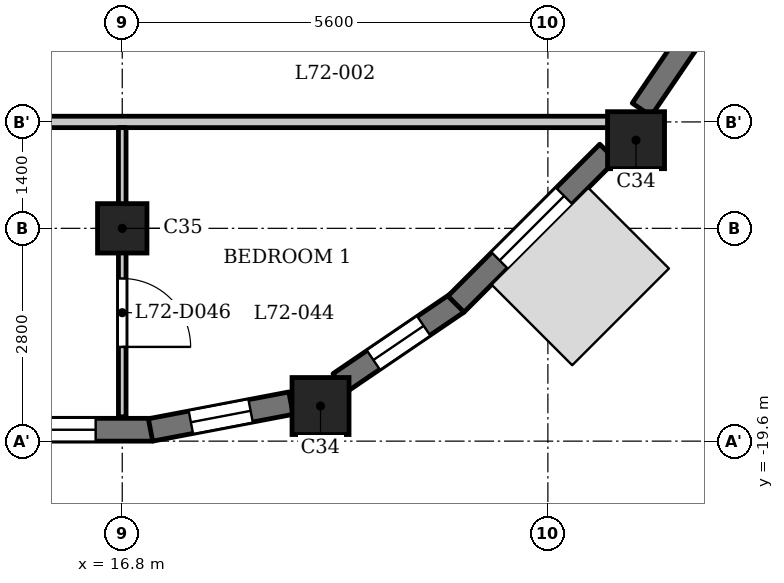
"""IFC4 building model, lengths in metres.
Left out: names, types, materials, properties, quantities, classifications, styles, units other than length and angle.
Written with IfcOpenShell. Run it as: python <this file> out.ifc"""

import sys

from ifc_helpers import new_model, si_unit, direction, frame, frame_2d, origin, origin_2d, place, context, subcontext, project, spatial, rectangle, extrude, element, fill, save


model = new_model("IFC4")
c1 = context("Model", 3, precision=1e-05, world=origin(), true_north=direction((0.0, 1.0)))
c2 = subcontext(c1, "Body", "Model", "MODEL_VIEW")
j1 = project(units=[si_unit("LENGTHUNIT", "METRE"), si_unit("PLANEANGLEUNIT", "RADIAN")], contexts=[c1])
p1 = place(None, origin())
s1 = spatial("IfcSite", under=j1, at=p1, CompositionType="ELEMENT")
p2 = place(p1, origin())
s2 = spatial("IfcBuilding", under=s1, at=p2, CompositionType="ELEMENT")
p3 = place(p2, frame((0.0, 0.0, 276.7)))
s3 = spatial("IfcBuildingStorey", under=s2, at=p3, CompositionType="ELEMENT", Elevation=276.7)
for number, where, z_axis, x_axis in (
    (1, (19.409, -19.138, 0.0), (0.0, 0.0, 1.0), (1.0, 0.0, 0.0)),
    (2, (23.56, -15.64, 0.0), (0.0, 0.0, 1.0), (1.0, 0.0, 0.0)),
):
    element("IfcColumn", number, at=place(p3, frame(where, z_axis=z_axis, x_axis=x_axis)), inside=s3, PredefinedType="COLUMN", context=c2, shape_type="SweptSolid", body=[
        extrude(rectangle(XDim=0.75, YDim=0.75, at=origin_2d()), origin(), (0.0, 0.0, 1.0), 3.5),
    ])
p4 = place(p3, frame((16.8, -16.8, 0.0), z_axis=(0.0, 0.0, 1.0), x_axis=(1.0, 0.0, 0.0)))
e3 = element("IfcColumn", 3, at=p4, inside=s3, PredefinedType="COLUMN", context=c2, shape_type="SweptSolid", body=[
    extrude(rectangle(XDim=0.65, YDim=0.65, at=origin_2d()), origin(), (0.0, 0.0, 1.0), 3.5),
])
p5 = place(p3, frame((14.375, -19.45, 0.0), z_axis=(0.0, 0.0, 1.0), x_axis=(1.0, 0.0, 0.0)))
e4 = element("IfcWall", 4, at=p5, inside=s3, PredefinedType="SOLIDWALL", context=c2, shape_type="SweptSolid", body=[
    extrude(rectangle(XDim=2.825, YDim=0.3, at=frame_2d((1.413, 0.0))), origin(), (0.0, 0.0, 1.0), 2.55),
])
p6 = place(p5, frame((0.275, 0.0, 0.9)))
e5 = element("IfcOpeningElement", 5, at=p6, cuts=e4, PredefinedType="OPENING", context=c2, shape_type="SweptSolid", body=[
    extrude(rectangle(XDim=1.8, YDim=1.25, at=frame_2d((0.9, 0.625))), frame((0.0, 0.16, 0.0), z_axis=(0.0, -1.0, 0.0), x_axis=(1.0, 0.0, 0.0)), (0.0, 0.0, 1.0), 0.32),
])
p7 = place(p3, frame((17.172, -19.453, 0.0), z_axis=(0.0, 0.0, 1.0), x_axis=(0.982284001233, 0.187398348234, 0.0)))
e6 = element("IfcWall", 6, at=p7, inside=s3, PredefinedType="SOLIDWALL", context=c2, shape_type="SweptSolid", body=[
    extrude(rectangle(XDim=1.881, YDim=0.3, at=frame_2d((0.941, 0.0))), origin(), (0.0, 0.0, 1.0), 2.55),
])
p8 = place(p7, frame((0.541, 0.0, 0.6)))
e7 = element("IfcOpeningElement", 7, at=p8, cuts=e6, PredefinedType="OPENING", context=c2, shape_type="SweptSolid", body=[
    extrude(rectangle(XDim=0.8, YDim=1.55, at=frame_2d((0.4, 0.775))), frame((0.0, 0.16, 0.0), z_axis=(0.0, -1.0, 0.0), x_axis=(1.0, 0.0, 0.0)), (0.0, 0.0, 1.0), 0.32),
])
p9 = place(p3, frame((19.657, -18.836, 0.0), z_axis=(0.0, 0.0, 1.0), x_axis=(0.82704477487, 0.562136051469, 0.0)))
e8 = element("IfcWall", 8, at=p9, inside=s3, PredefinedType="SOLIDWALL", context=c2, shape_type="SweptSolid", body=[
    extrude(rectangle(XDim=1.881, YDim=0.3, at=frame_2d((0.94, 0.0))), origin(), (0.0, 0.0, 1.0), 2.55),
])
p10 = place(p9, frame((0.541, 0.0, 0.6)))
e9 = element("IfcOpeningElement", 9, at=p10, cuts=e8, PredefinedType="OPENING", context=c2, shape_type="SweptSolid", body=[
    extrude(rectangle(XDim=0.8, YDim=1.55, at=frame_2d((0.4, 0.775))), frame((0.0, 0.16, 0.0), z_axis=(0.0, -1.0, 0.0), x_axis=(1.0, 0.0, 0.0)), (0.0, 0.0, 1.0), 0.32),
])
p11 = place(p3, frame((21.191, -17.797, 0.0), z_axis=(0.0, 0.0, 1.0), x_axis=(0.707106781187, 0.707106781187, 0.0)))
e10 = element("IfcWall", 10, at=p11, inside=s3, PredefinedType="SOLIDWALL", context=c2, shape_type="SweptSolid", body=[
    extrude(rectangle(XDim=2.825, YDim=0.3, at=frame_2d((1.413, 0.0))), origin(), (0.0, 0.0, 1.0), 2.55),
])
p12 = place(p11, frame((0.812, 0.0, 0.6)))
e11 = element("IfcOpeningElement", 11, at=p12, cuts=e10, PredefinedType="OPENING", context=c2, shape_type="SweptSolid", body=[
    extrude(rectangle(XDim=1.2, YDim=1.55, at=frame_2d((0.6, 0.775))), frame((0.0, 0.16, 0.0), z_axis=(0.0, -1.0, 0.0), x_axis=(1.0, 0.0, 0.0)), (0.0, 0.0, 1.0), 0.32),
])
p13 = place(p3, frame((23.634, -15.237, 0.0), z_axis=(0.0, 0.0, 1.0), x_axis=(0.562099454787, 0.827069648173, 0.0)))
e12 = element("IfcWall", 12, at=p13, inside=s3, PredefinedType="SOLIDWALL", context=c2, shape_type="SweptSolid", body=[
    extrude(rectangle(XDim=1.427, YDim=0.3, at=frame_2d((0.714, 0.0))), origin(), (0.0, 0.0, 1.0), 2.55),
])
p14 = place(p3, frame((-23.322, -15.4, 0.0), z_axis=(0.0, 0.0, 1.0), x_axis=(1.0, 0.0, 0.0)))
e13 = element("IfcWall", 13, at=p14, inside=s3, PredefinedType="PARTITIONING", context=c2, shape_type="SweptSolid", body=[
    extrude(rectangle(XDim=46.872, YDim=0.15, at=frame_2d((23.436, 0.0))), origin(), (0.0, 0.0, 1.0), 3.2),
])
p15 = place(p14, frame((13.772, 0.0, 0.0)))
e14 = element("IfcOpeningElement", 14, at=p15, cuts=e13, PredefinedType="OPENING", context=c2, shape_type="SweptSolid", body=[
    extrude(rectangle(XDim=1.0, YDim=2.1, at=frame_2d((0.5, 1.05))), frame((0.0, 0.085, 0.0), z_axis=(0.0, -1.0, 0.0), x_axis=(1.0, 0.0, 0.0)), (0.0, 0.0, 1.0), 0.17),
])
p16 = place(p14, frame((21.772, 0.0, 0.0)))
e15 = element("IfcOpeningElement", 15, at=p16, cuts=e13, PredefinedType="OPENING", context=c2, shape_type="SweptSolid", body=[
    extrude(rectangle(XDim=1.0, YDim=2.1, at=frame_2d((0.5, 1.05))), frame((0.0, 0.085, 0.0), z_axis=(0.0, -1.0, 0.0), x_axis=(1.0, 0.0, 0.0)), (0.0, 0.0, 1.0), 0.17),
])
p17 = place(p14, frame((31.972, 0.0, 0.0)))
e16 = element("IfcOpeningElement", 16, at=p17, cuts=e13, PredefinedType="OPENING", context=c2, shape_type="SweptSolid", body=[
    extrude(rectangle(XDim=1.0, YDim=2.1, at=frame_2d((0.5, 1.05))), frame((0.0, 0.085, 0.0), z_axis=(0.0, -1.0, 0.0), x_axis=(1.0, 0.0, 0.0)), (0.0, 0.0, 1.0), 0.17),
])
p18 = place(p3, frame((16.8, -19.28, 0.0), z_axis=(0.0, 0.0, 1.0), x_axis=(0.0, 1.0, 0.0)))
e17 = element("IfcWall", 17, at=p18, inside=s3, PredefinedType="PARTITIONING", context=c2, shape_type="SweptSolid", body=[
    extrude(rectangle(XDim=3.805, YDim=0.1, at=frame_2d((1.902, 0.0))), origin(), (0.0, 0.0, 1.0), 3.2),
])
p19 = place(p18, frame((0.92, 0.0, 0.0)))
e18 = element("IfcOpeningElement", 18, at=p19, cuts=e17, PredefinedType="OPENING", context=c2, shape_type="SweptSolid", body=[
    extrude(rectangle(XDim=0.9, YDim=2.1, at=frame_2d((0.45, 1.05))), frame((0.0, 0.06, 0.0), z_axis=(0.0, -1.0, 0.0), x_axis=(1.0, 0.0, 0.0)), (0.0, 0.0, 1.0), 0.12),
])
p20 = place(p19, origin())
e19 = element("IfcDoor", 19, at=p20, inside=s3, OperationType="SINGLE_SWING_LEFT", PredefinedType="DOOR", context=c2, shape_type="SweptSolid", body=[
    extrude(rectangle(XDim=0.9, YDim=2.1, at=frame_2d((0.45, 1.05))), frame((0.0, 0.025, 0.0), z_axis=(0.0, -1.0, 0.0), x_axis=(1.0, 0.0, 0.0)), (0.0, 0.0, 1.0), 0.05),
])
fill(e18, e19)
p21 = place(p6, origin())
e20 = element("IfcWindow", 20, at=p21, inside=s3, PartitioningType="SINGLE_PANEL", PredefinedType="WINDOW", context=c2, shape_type="SweptSolid", body=[
    extrude(rectangle(XDim=1.8, YDim=1.25, at=frame_2d((0.9, 0.625))), frame((0.0, 0.03, 0.0), z_axis=(0.0, -1.0, 0.0), x_axis=(1.0, 0.0, 0.0)), (0.0, 0.0, 1.0), 0.06),
])
fill(e5, e20)
p22 = place(p8, origin())
e21 = element("IfcWindow", 21, at=p22, inside=s3, PartitioningType="SINGLE_PANEL", PredefinedType="WINDOW", context=c2, shape_type="SweptSolid", body=[
    extrude(rectangle(XDim=0.8, YDim=1.55, at=frame_2d((0.4, 0.775))), frame((0.0, 0.03, 0.0), z_axis=(0.0, -1.0, 0.0), x_axis=(1.0, 0.0, 0.0)), (0.0, 0.0, 1.0), 0.06),
])
fill(e7, e21)
p23 = place(p10, origin())
e22 = element("IfcWindow", 22, at=p23, inside=s3, PartitioningType="SINGLE_PANEL", PredefinedType="WINDOW", context=c2, shape_type="SweptSolid", body=[
    extrude(rectangle(XDim=0.8, YDim=1.55, at=frame_2d((0.4, 0.775))), frame((0.0, 0.03, 0.0), z_axis=(0.0, -1.0, 0.0), x_axis=(1.0, 0.0, 0.0)), (0.0, 0.0, 1.0), 0.06),
])
fill(e9, e22)
p24 = place(p12, origin())
e23 = element("IfcWindow", 23, at=p24, inside=s3, PartitioningType="SINGLE_PANEL", PredefinedType="WINDOW", context=c2, shape_type="SweptSolid", body=[
    extrude(rectangle(XDim=1.2, YDim=1.55, at=frame_2d((0.6, 0.775))), frame((0.0, 0.03, 0.0), z_axis=(0.0, -1.0, 0.0), x_axis=(1.0, 0.0, 0.0)), (0.0, 0.0, 1.0), 0.06),
])
fill(e11, e23)
save(model, sys.argv[1])
